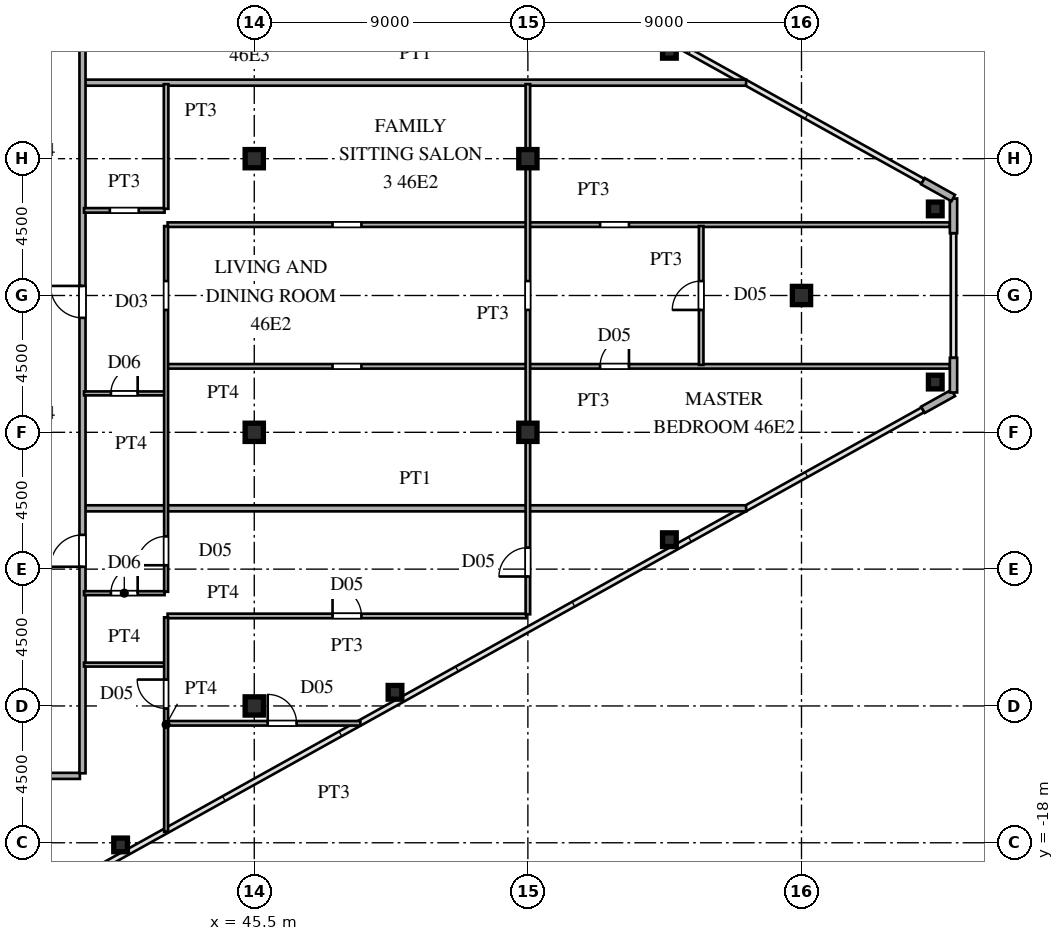
"""IFC4 building model, lengths in metres.
Left out: names, types, materials, properties, quantities, classifications, styles, units other than length and angle.
Written with IfcOpenShell. Run it as: python <this file> out.ifc"""

import sys

from ifc_helpers import new_model, si_unit, direction, frame, frame_2d, origin, origin_2d, place, context, subcontext, project, spatial, rectangle, hollow_rectangle, i_section, extrude, source, transform, mapped, element, fill, save


model = new_model("IFC4")
c1 = context("Model", 3, precision=1e-05, world=origin(), true_north=direction((0.0, 1.0)))
c2 = subcontext(c1, "Body", "Model", "MODEL_VIEW")
j1 = project(units=[si_unit("LENGTHUNIT", "METRE"), si_unit("PLANEANGLEUNIT", "RADIAN")], contexts=[c1])
p1 = place(None, origin())
s1 = spatial("IfcSite", under=j1, at=p1, CompositionType="ELEMENT")
p2 = place(p1, origin())
s2 = spatial("IfcBuilding", under=s1, at=p2, CompositionType="ELEMENT")
p3 = place(p2, frame((0.0, 0.0, 174.3)))
s3 = spatial("IfcBuildingStorey", under=s2, at=p3, CompositionType="ELEMENT", Elevation=174.3)
m1 = source(origin(), c2, "Body", "SweptSolid", [
    extrude(i_section(OverallWidth=0.6, OverallDepth=0.6, WebThickness=0.025, FlangeThickness=0.04, at=origin_2d()), origin(), (0.0, 0.0, 1.0), 3.6),
])
for number, where, z_axis, x_axis in (
    (1, (45.5, -13.5, 0.0), (0.0, 0.0, 1.0), (1.0, 0.0, 0.0)),
    (2, (45.5, -4.5, 0.0), (0.0, 0.0, 1.0), (1.0, 0.0, 0.0)),
    (3, (45.5, 4.5, 0.0), (0.0, 0.0, 1.0), (1.0, 0.0, 0.0)),
    (4, (54.5, -4.5, 0.0), (0.0, 0.0, 1.0), (1.0, 0.0, 0.0)),
    (5, (54.5, 4.5, 0.0), (0.0, 0.0, 1.0), (1.0, 0.0, 0.0)),
    (6, (63.5, 0.0, 0.0), (0.0, 0.0, 1.0), (1.0, 0.0, 0.0)),
):
    element("IfcColumn", number, at=place(p3, frame(where, z_axis=z_axis, x_axis=x_axis)), inside=s3, PredefinedType="COLUMN", context=c2, shape_type="MappedRepresentation", body=[
        mapped(m1, transform((0.0, 0.0, 0.0), scale=1.0)),
    ])
m2 = source(origin(), c2, "Body", "SweptSolid", [
    extrude(hollow_rectangle(XDim=0.45, YDim=0.45, WallThickness=0.018, at=origin_2d()), origin(), (0.0, 0.0, 1.0), 3.6),
])
for number, where, z_axis, x_axis in (
    (7, (67.9, -2.847, 0.0), (0.0, 0.0, 1.0), (1.0, 0.0, 0.0)),
    (8, (67.9, 2.847, 0.0), (0.0, 0.0, 1.0), (1.0, 0.0, 0.0)),
    (9, (41.104, -18.071, 0.0), (0.0, 0.0, 1.0), (1.0, 0.0, 0.0)),
    (10, (50.129, -13.051, 0.0), (0.0, 0.0, 1.0), (1.0, 0.0, 0.0)),
    (11, (59.155, -8.031, 0.0), (0.0, 0.0, 1.0), (1.0, 0.0, 0.0)),
    (12, (59.155, 8.031, 0.0), (0.0, 0.0, 1.0), (1.0, 0.0, 0.0)),
):
    element("IfcColumn", number, at=place(p3, frame(where, z_axis=z_axis, x_axis=x_axis)), inside=s3, PredefinedType="COLUMN", context=c2, shape_type="MappedRepresentation", body=[
        mapped(m2, transform((0.0, 0.0, 0.0), scale=1.0)),
    ])
for number, where, z_axis, x_axis in (
    (13, (67.495, -3.759, 0.0), (0.0, 0.0, 1.0), (0.874, 0.486, 0.0)),
    (14, (68.5, -3.19, 0.0), (0.0, 0.0, 1.0), (0.0, 1.0, 0.0)),
    (15, (68.5, 2.05, 0.0), (0.0, 0.0, 1.0), (0.0, 1.0, 0.0)),
    (16, (68.491, 3.205, 0.0), (0.0, 0.0, 1.0), (-0.874, 0.486, 0.0)),
):
    element("IfcWall", number, at=place(p3, frame(where, z_axis=z_axis, x_axis=x_axis)), inside=s3, PredefinedType="SOLIDWALL", context=c2, shape_type="SweptSolid", body=[
        extrude(rectangle(XDim=1.14, YDim=0.24, at=frame_2d((0.57, 0.0))), origin(), (0.0, 0.0, 1.0), 3.38),
    ])
p4 = place(p3, frame((27.5, -15.8, 0.0), z_axis=(0.0, 0.0, 1.0), x_axis=(1.0, 0.0, 0.0)))
e17 = element("IfcWall", 17, at=p4, inside=s3, PredefinedType="PARTITIONING", context=c2, shape_type="SweptSolid", body=[
    extrude(rectangle(XDim=12.265, YDim=0.2, at=frame_2d((6.132, 0.0))), origin(), (0.0, 0.0, 1.0), 3.38),
])
p5 = place(p3, frame((42.65, -14.07, 0.0), z_axis=(0.0, 0.0, 1.0), x_axis=(1.0, 0.0, 0.0)))
e18 = element("IfcWall", 18, at=p5, inside=s3, PredefinedType="PARTITIONING", context=c2, shape_type="SweptSolid", body=[
    extrude(rectangle(XDim=6.341, YDim=0.15, at=frame_2d((3.17, 0.0))), origin(), (0.0, 0.0, 1.0), 3.38),
])
p6 = place(p5, frame((3.292, 0.0, 0.0)))
e19 = element("IfcOpeningElement", 19, at=p6, cuts=e18, PredefinedType="OPENING", context=c2, shape_type="SweptSolid", body=[
    extrude(rectangle(XDim=0.95, YDim=2.15, at=frame_2d((0.475, 1.075))), frame((0.0, 0.085, 0.0), z_axis=(0.0, -1.0, 0.0), x_axis=(1.0, 0.0, 0.0)), (0.0, 0.0, 1.0), 0.17),
])
p7 = place(p3, frame((39.9, -12.14, 0.0), z_axis=(0.0, 0.0, 1.0), x_axis=(1.0, 0.0, 0.0)))
e20 = element("IfcWall", 20, at=p7, inside=s3, PredefinedType="PARTITIONING", context=c2, shape_type="SweptSolid", body=[
    extrude(rectangle(XDim=2.65, YDim=0.13, at=frame_2d((1.325, 0.0))), origin(), (0.0, 0.0, 1.0), 3.38),
])
p8 = place(p3, frame((42.65, -10.54, 0.0), z_axis=(0.0, 0.0, 1.0), x_axis=(1.0, 0.0, 0.0)))
e21 = element("IfcWall", 21, at=p8, inside=s3, PredefinedType="PARTITIONING", context=c2, shape_type="SweptSolid", body=[
    extrude(rectangle(XDim=11.8, YDim=0.15, at=frame_2d((5.9, 0.0))), origin(), (0.0, 0.0, 1.0), 3.38),
])
p9 = place(p8, frame((5.425, 0.0, 0.0)))
e22 = element("IfcOpeningElement", 22, at=p9, cuts=e21, PredefinedType="OPENING", context=c2, shape_type="SweptSolid", body=[
    extrude(rectangle(XDim=0.95, YDim=2.15, at=frame_2d((0.475, 1.075))), frame((0.0, 0.085, 0.0), z_axis=(0.0, -1.0, 0.0), x_axis=(1.0, 0.0, 0.0)), (0.0, 0.0, 1.0), 0.17),
])
p10 = place(p3, frame((39.9, -9.79, 0.0), z_axis=(0.0, 0.0, 1.0), x_axis=(1.0, 0.0, 0.0)))
e23 = element("IfcWall", 23, at=p10, inside=s3, PredefinedType="PARTITIONING", context=c2, shape_type="SweptSolid", body=[
    extrude(rectangle(XDim=2.65, YDim=0.13, at=frame_2d((1.325, 0.0))), origin(), (0.0, 0.0, 1.0), 3.38),
])
p11 = place(p10, frame((0.885, 0.0, 0.0)))
e24 = element("IfcOpeningElement", 24, at=p11, cuts=e23, PredefinedType="OPENING", context=c2, shape_type="SweptSolid", body=[
    extrude(rectangle(XDim=0.88, YDim=2.1, at=frame_2d((0.44, 1.05))), frame((0.0, 0.075, 0.0), z_axis=(0.0, -1.0, 0.0), x_axis=(1.0, 0.0, 0.0)), (0.0, 0.0, 1.0), 0.15),
])
p12 = place(p3, frame((39.93, -7.0, 0.0), z_axis=(0.0, 0.0, 1.0), x_axis=(1.0, 0.0, 0.0)))
e25 = element("IfcWall", 25, at=p12, inside=s3, PredefinedType="PARTITIONING", context=c2, shape_type="SweptSolid", body=[
    extrude(rectangle(XDim=21.748, YDim=0.2, at=frame_2d((10.874, 0.0))), origin(), (0.0, 0.0, 1.0), 3.38),
])
p13 = place(p3, frame((39.9, -3.22, 0.0), z_axis=(0.0, 0.0, 1.0), x_axis=(1.0, 0.0, 0.0)))
e26 = element("IfcWall", 26, at=p13, inside=s3, PredefinedType="PARTITIONING", context=c2, shape_type="SweptSolid", body=[
    extrude(rectangle(XDim=2.65, YDim=0.13, at=frame_2d((1.325, 0.0))), origin(), (0.0, 0.0, 1.0), 3.38),
])
p14 = place(p13, frame((0.885, 0.0, 0.0)))
e27 = element("IfcOpeningElement", 27, at=p14, cuts=e26, PredefinedType="OPENING", context=c2, shape_type="SweptSolid", body=[
    extrude(rectangle(XDim=0.88, YDim=2.1, at=frame_2d((0.44, 1.05))), frame((0.0, 0.075, 0.0), z_axis=(0.0, -1.0, 0.0), x_axis=(1.0, 0.0, 0.0)), (0.0, 0.0, 1.0), 0.15),
])
p15 = place(p3, frame((42.65, -2.33, 0.0), z_axis=(0.0, 0.0, 1.0), x_axis=(1.0, 0.0, 0.0)))
e28 = element("IfcWall", 28, at=p15, inside=s3, PredefinedType="PARTITIONING", context=c2, shape_type="SweptSolid", body=[
    extrude(rectangle(XDim=25.725, YDim=0.15, at=frame_2d((12.863, 0.0))), origin(), (0.0, 0.0, 1.0), 3.38),
])
p16 = place(p15, frame((5.425, 0.0, 0.0)))
e29 = element("IfcOpeningElement", 29, at=p16, cuts=e28, PredefinedType="OPENING", context=c2, shape_type="SweptSolid", body=[
    extrude(rectangle(XDim=0.95, YDim=2.15, at=frame_2d((0.475, 1.075))), frame((0.0, 0.085, 0.0), z_axis=(0.0, -1.0, 0.0), x_axis=(1.0, 0.0, 0.0)), (0.0, 0.0, 1.0), 0.17),
])
p17 = place(p15, frame((14.225, 0.0, 0.0)))
e30 = element("IfcOpeningElement", 30, at=p17, cuts=e28, PredefinedType="OPENING", context=c2, shape_type="SweptSolid", body=[
    extrude(rectangle(XDim=0.95, YDim=2.15, at=frame_2d((0.475, 1.075))), frame((0.0, 0.085, 0.0), z_axis=(0.0, -1.0, 0.0), x_axis=(1.0, 0.0, 0.0)), (0.0, 0.0, 1.0), 0.17),
])
p18 = place(p3, frame((42.65, 2.33, 0.0), z_axis=(0.0, 0.0, 1.0), x_axis=(1.0, 0.0, 0.0)))
e31 = element("IfcWall", 31, at=p18, inside=s3, PredefinedType="PARTITIONING", context=c2, shape_type="SweptSolid", body=[
    extrude(rectangle(XDim=25.725, YDim=0.15, at=frame_2d((12.863, 0.0))), origin(), (0.0, 0.0, 1.0), 3.38),
])
p19 = place(p18, frame((5.425, 0.0, 0.0)))
e32 = element("IfcOpeningElement", 32, at=p19, cuts=e31, PredefinedType="OPENING", context=c2, shape_type="SweptSolid", body=[
    extrude(rectangle(XDim=0.95, YDim=2.15, at=frame_2d((0.475, 1.075))), frame((0.0, 0.085, 0.0), z_axis=(0.0, -1.0, 0.0), x_axis=(1.0, 0.0, 0.0)), (0.0, 0.0, 1.0), 0.17),
])
p20 = place(p18, frame((14.225, 0.0, 0.0)))
e33 = element("IfcOpeningElement", 33, at=p20, cuts=e31, PredefinedType="OPENING", context=c2, shape_type="SweptSolid", body=[
    extrude(rectangle(XDim=0.95, YDim=2.15, at=frame_2d((0.475, 1.075))), frame((0.0, 0.085, 0.0), z_axis=(0.0, -1.0, 0.0), x_axis=(1.0, 0.0, 0.0)), (0.0, 0.0, 1.0), 0.17),
])
p21 = place(p3, frame((39.9, 2.8, 0.0), z_axis=(0.0, 0.0, 1.0), x_axis=(1.0, 0.0, 0.0)))
e34 = element("IfcWall", 34, at=p21, inside=s3, PredefinedType="PARTITIONING", context=c2, shape_type="SweptSolid", body=[
    extrude(rectangle(XDim=2.65, YDim=0.15, at=frame_2d((1.325, 0.0))), origin(), (0.0, 0.0, 1.0), 3.38),
])
p22 = place(p21, frame((0.85, 0.0, 0.0)))
e35 = element("IfcOpeningElement", 35, at=p22, cuts=e34, PredefinedType="OPENING", context=c2, shape_type="SweptSolid", body=[
    extrude(rectangle(XDim=0.95, YDim=2.15, at=frame_2d((0.475, 1.075))), frame((0.0, 0.085, 0.0), z_axis=(0.0, -1.0, 0.0), x_axis=(1.0, 0.0, 0.0)), (0.0, 0.0, 1.0), 0.17),
])
p23 = place(p3, frame((39.93, 7.0, 0.0), z_axis=(0.0, 0.0, 1.0), x_axis=(1.0, 0.0, 0.0)))
e36 = element("IfcWall", 36, at=p23, inside=s3, PredefinedType="PARTITIONING", context=c2, shape_type="SweptSolid", body=[
    extrude(rectangle(XDim=21.748, YDim=0.2, at=frame_2d((10.874, 0.0))), origin(), (0.0, 0.0, 1.0), 3.38),
])
p24 = place(p3, frame((39.85, -15.715, 0.0), z_axis=(0.0, 0.0, 1.0), x_axis=(0.0, 1.0, 0.0)))
e37 = element("IfcWall", 37, at=p24, inside=s3, PredefinedType="PARTITIONING", context=c2, shape_type="SweptSolid", body=[
    extrude(rectangle(XDim=31.43, YDim=0.2, at=frame_2d((15.715, 0.0))), origin(), (0.0, 0.0, 1.0), 3.38),
])
p25 = place(p24, frame((6.792, 0.0, 0.0)))
e38 = element("IfcOpeningElement", 38, at=p25, cuts=e37, PredefinedType="OPENING", context=c2, shape_type="SweptSolid", body=[
    extrude(rectangle(XDim=1.05, YDim=2.25, at=frame_2d((0.525, 1.125))), frame((0.0, 0.11, 0.0), z_axis=(0.0, -1.0, 0.0), x_axis=(1.0, 0.0, 0.0)), (0.0, 0.0, 1.0), 0.22),
])
p26 = place(p24, frame((14.98, 0.0, 0.0)))
e39 = element("IfcOpeningElement", 39, at=p26, cuts=e37, PredefinedType="OPENING", context=c2, shape_type="SweptSolid", body=[
    extrude(rectangle(XDim=1.05, YDim=2.25, at=frame_2d((0.525, 1.125))), frame((0.0, 0.11, 0.0), z_axis=(0.0, -1.0, 0.0), x_axis=(1.0, 0.0, 0.0)), (0.0, 0.0, 1.0), 0.22),
])
p27 = place(p24, frame((26.59, 0.0, 0.0)))
e40 = element("IfcOpeningElement", 40, at=p27, cuts=e37, PredefinedType="OPENING", context=c2, shape_type="SweptSolid", body=[
    extrude(rectangle(XDim=1.05, YDim=2.25, at=frame_2d((0.525, 1.125))), frame((0.0, 0.11, 0.0), z_axis=(0.0, -1.0, 0.0), x_axis=(1.0, 0.0, 0.0)), (0.0, 0.0, 1.0), 0.22),
])
p28 = place(p3, frame((42.6, -17.64, 0.0), z_axis=(0.0, 0.0, 1.0), x_axis=(0.0, 1.0, 0.0)))
e41 = element("IfcWall", 41, at=p28, inside=s3, PredefinedType="PARTITIONING", context=c2, shape_type="SweptSolid", body=[
    extrude(rectangle(XDim=7.055, YDim=0.13, at=frame_2d((3.527, 0.0))), origin(), (0.0, 0.0, 1.0), 3.38),
])
p29 = place(p28, frame((4.058, 0.0, 0.0)))
e42 = element("IfcOpeningElement", 42, at=p29, cuts=e41, PredefinedType="OPENING", context=c2, shape_type="SweptSolid", body=[
    extrude(rectangle(XDim=0.95, YDim=2.15, at=frame_2d((0.475, 1.075))), frame((0.0, 0.075, 0.0), z_axis=(0.0, -1.0, 0.0), x_axis=(1.0, 0.0, 0.0)), (0.0, 0.0, 1.0), 0.15),
])
p30 = place(p3, frame((42.6, -9.745, 0.0), z_axis=(0.0, 0.0, 1.0), x_axis=(0.0, 1.0, 0.0)))
e43 = element("IfcWall", 43, at=p30, inside=s3, PredefinedType="PARTITIONING", context=c2, shape_type="SweptSolid", body=[
    extrude(rectangle(XDim=12.028, YDim=0.13, at=frame_2d((6.014, 0.0))), origin(), (0.0, 0.0, 1.0), 3.38),
])
p31 = place(p30, frame((0.873, 0.0, 0.0)))
e44 = element("IfcOpeningElement", 44, at=p31, cuts=e43, PredefinedType="OPENING", context=c2, shape_type="SweptSolid", body=[
    extrude(rectangle(XDim=0.95, YDim=2.15, at=frame_2d((0.475, 1.075))), frame((0.0, 0.075, 0.0), z_axis=(0.0, -1.0, 0.0), x_axis=(1.0, 0.0, 0.0)), (0.0, 0.0, 1.0), 0.15),
])
p32 = place(p30, frame((9.27, 0.0, 0.0)))
e45 = element("IfcOpeningElement", 45, at=p32, cuts=e43, PredefinedType="OPENING", context=c2, shape_type="SweptSolid", body=[
    extrude(rectangle(XDim=0.95, YDim=2.15, at=frame_2d((0.475, 1.075))), frame((0.0, 0.075, 0.0), z_axis=(0.0, -1.0, 0.0), x_axis=(1.0, 0.0, 0.0)), (0.0, 0.0, 1.0), 0.15),
])
p33 = place(p3, frame((42.6, 2.852, 0.0), z_axis=(0.0, 0.0, 1.0), x_axis=(0.0, 1.0, 0.0)))
e46 = element("IfcWall", 46, at=p33, inside=s3, PredefinedType="PARTITIONING", context=c2, shape_type="SweptSolid", body=[
    extrude(rectangle(XDim=4.098, YDim=0.15, at=frame_2d((2.049, 0.0))), origin(), (0.0, 0.0, 1.0), 3.38),
])
p34 = place(p3, frame((54.5, -10.485, 0.0), z_axis=(0.0, 0.0, 1.0), x_axis=(0.0, 1.0, 0.0)))
e47 = element("IfcWall", 47, at=p34, inside=s3, PredefinedType="PARTITIONING", context=c2, shape_type="SweptSolid", body=[
    extrude(rectangle(XDim=17.435, YDim=0.15, at=frame_2d((8.718, 0.0))), origin(), (0.0, 0.0, 1.0), 2.78),
])
p35 = place(p34, frame((1.242, 0.0, 0.0)))
e48 = element("IfcOpeningElement", 48, at=p35, cuts=e47, PredefinedType="OPENING", context=c2, shape_type="SweptSolid", body=[
    extrude(rectangle(XDim=0.95, YDim=2.15, at=frame_2d((0.475, 1.075))), frame((0.0, 0.085, 0.0), z_axis=(0.0, -1.0, 0.0), x_axis=(1.0, 0.0, 0.0)), (0.0, 0.0, 1.0), 0.17),
])
p36 = place(p34, frame((10.01, 0.0, 0.0)))
e49 = element("IfcOpeningElement", 49, at=p36, cuts=e47, PredefinedType="OPENING", context=c2, shape_type="SweptSolid", body=[
    extrude(rectangle(XDim=0.95, YDim=2.15, at=frame_2d((0.475, 1.075))), frame((0.0, 0.085, 0.0), z_axis=(0.0, -1.0, 0.0), x_axis=(1.0, 0.0, 0.0)), (0.0, 0.0, 1.0), 0.17),
])
p37 = place(p3, frame((60.2, -2.283, 0.0), z_axis=(0.0, 0.0, 1.0), x_axis=(0.0, 1.0, 0.0)))
e50 = element("IfcWall", 50, at=p37, inside=s3, PredefinedType="PARTITIONING", context=c2, shape_type="SweptSolid", body=[
    extrude(rectangle(XDim=4.566, YDim=0.15, at=frame_2d((2.283, 0.0))), origin(), (0.0, 0.0, 1.0), 3.38),
])
p38 = place(p37, frame((1.808, 0.0, 0.0)))
e51 = element("IfcOpeningElement", 51, at=p38, cuts=e50, PredefinedType="OPENING", context=c2, shape_type="SweptSolid", body=[
    extrude(rectangle(XDim=0.95, YDim=2.15, at=frame_2d((0.475, 1.075))), frame((0.0, 0.085, 0.0), z_axis=(0.0, -1.0, 0.0), x_axis=(1.0, 0.0, 0.0)), (0.0, 0.0, 1.0), 0.17),
])
m3 = source(origin(), c2, "Body", "SweptSolid", [
    extrude(rectangle(XDim=0.95, YDim=2.15, at=frame_2d((0.475, 1.075))), frame((0.0, 0.025, 0.0), z_axis=(0.0, -1.0, 0.0), x_axis=(1.0, 0.0, 0.0)), (0.0, 0.0, 1.0), 0.05),
])
p39 = place(p6, origin())
e52 = element("IfcDoor", 52, at=p39, inside=s3, OperationType="SINGLE_SWING_LEFT", PredefinedType="DOOR", context=c2, shape_type="MappedRepresentation", body=[
    mapped(m3, transform((0.0, 0.0, 0.0), scale=1.0)),
])
fill(e19, e52)
p40 = place(p9, origin())
e53 = element("IfcDoor", 53, at=p40, inside=s3, OperationType="SINGLE_SWING_LEFT", PredefinedType="DOOR", context=c2, shape_type="MappedRepresentation", body=[
    mapped(m3, transform((0.0, 0.0, 0.0), scale=1.0)),
])
fill(e22, e53)
m4 = source(origin(), c2, "Body", "SweptSolid", [
    extrude(rectangle(XDim=0.88, YDim=2.1, at=frame_2d((0.44, 1.05))), frame((0.0, 0.025, 0.0), z_axis=(0.0, -1.0, 0.0), x_axis=(1.0, 0.0, 0.0)), (0.0, 0.0, 1.0), 0.05),
])
p41 = place(p11, origin())
e54 = element("IfcDoor", 54, at=p41, inside=s3, OperationType="SINGLE_SWING_RIGHT", PredefinedType="DOOR", context=c2, shape_type="MappedRepresentation", body=[
    mapped(m4, transform((0.0, 0.0, 0.0), scale=1.0)),
])
fill(e24, e54)
p42 = place(p14, origin())
e55 = element("IfcDoor", 55, at=p42, inside=s3, OperationType="SINGLE_SWING_RIGHT", PredefinedType="DOOR", context=c2, shape_type="MappedRepresentation", body=[
    mapped(m4, transform((0.0, 0.0, 0.0), scale=1.0)),
])
fill(e27, e55)
p43 = place(p17, origin())
e56 = element("IfcDoor", 56, at=p43, inside=s3, OperationType="SINGLE_SWING_RIGHT", PredefinedType="DOOR", context=c2, shape_type="MappedRepresentation", body=[
    mapped(m3, transform((0.0, 0.0, 0.0), scale=1.0)),
])
fill(e30, e56)
m5 = source(origin(), c2, "Body", "SweptSolid", [
    extrude(rectangle(XDim=1.05, YDim=2.25, at=frame_2d((0.525, 1.125))), frame((0.0, 0.025, 0.0), z_axis=(0.0, -1.0, 0.0), x_axis=(1.0, 0.0, 0.0)), (0.0, 0.0, 1.0), 0.05),
])
p44 = place(p25, origin())
e57 = element("IfcDoor", 57, at=p44, inside=s3, OperationType="SINGLE_SWING_LEFT", PredefinedType="DOOR", context=c2, shape_type="MappedRepresentation", body=[
    mapped(m5, transform((0.0, 0.0, 0.0), scale=1.0)),
])
fill(e38, e57)
p45 = place(p26, origin())
e58 = element("IfcDoor", 58, at=p45, inside=s3, OperationType="SINGLE_SWING_RIGHT", PredefinedType="DOOR", context=c2, shape_type="MappedRepresentation", body=[
    mapped(m5, transform((0.0, 0.0, 0.0), scale=1.0)),
])
fill(e39, e58)
p46 = place(p29, origin())
e59 = element("IfcDoor", 59, at=p46, inside=s3, OperationType="SINGLE_SWING_RIGHT", PredefinedType="DOOR", context=c2, shape_type="MappedRepresentation", body=[
    mapped(m3, transform((0.0, 0.0, 0.0), scale=1.0)),
])
fill(e42, e59)
p47 = place(p31, origin())
e60 = element("IfcDoor", 60, at=p47, inside=s3, OperationType="SINGLE_SWING_LEFT", PredefinedType="DOOR", context=c2, shape_type="MappedRepresentation", body=[
    mapped(m3, transform((0.0, 0.0, 0.0), scale=1.0)),
])
fill(e44, e60)
p48 = place(p35, origin())
e61 = element("IfcDoor", 61, at=p48, inside=s3, OperationType="SINGLE_SWING_LEFT", PredefinedType="DOOR", context=c2, shape_type="MappedRepresentation", body=[
    mapped(m3, transform((0.0, 0.0, 0.0), scale=1.0)),
])
fill(e48, e61)
p49 = place(p38, origin())
e62 = element("IfcDoor", 62, at=p49, inside=s3, OperationType="SINGLE_SWING_LEFT", PredefinedType="DOOR", context=c2, shape_type="MappedRepresentation", body=[
    mapped(m3, transform((0.0, 0.0, 0.0), scale=1.0)),
])
fill(e51, e62)
save(model, sys.argv[1])
